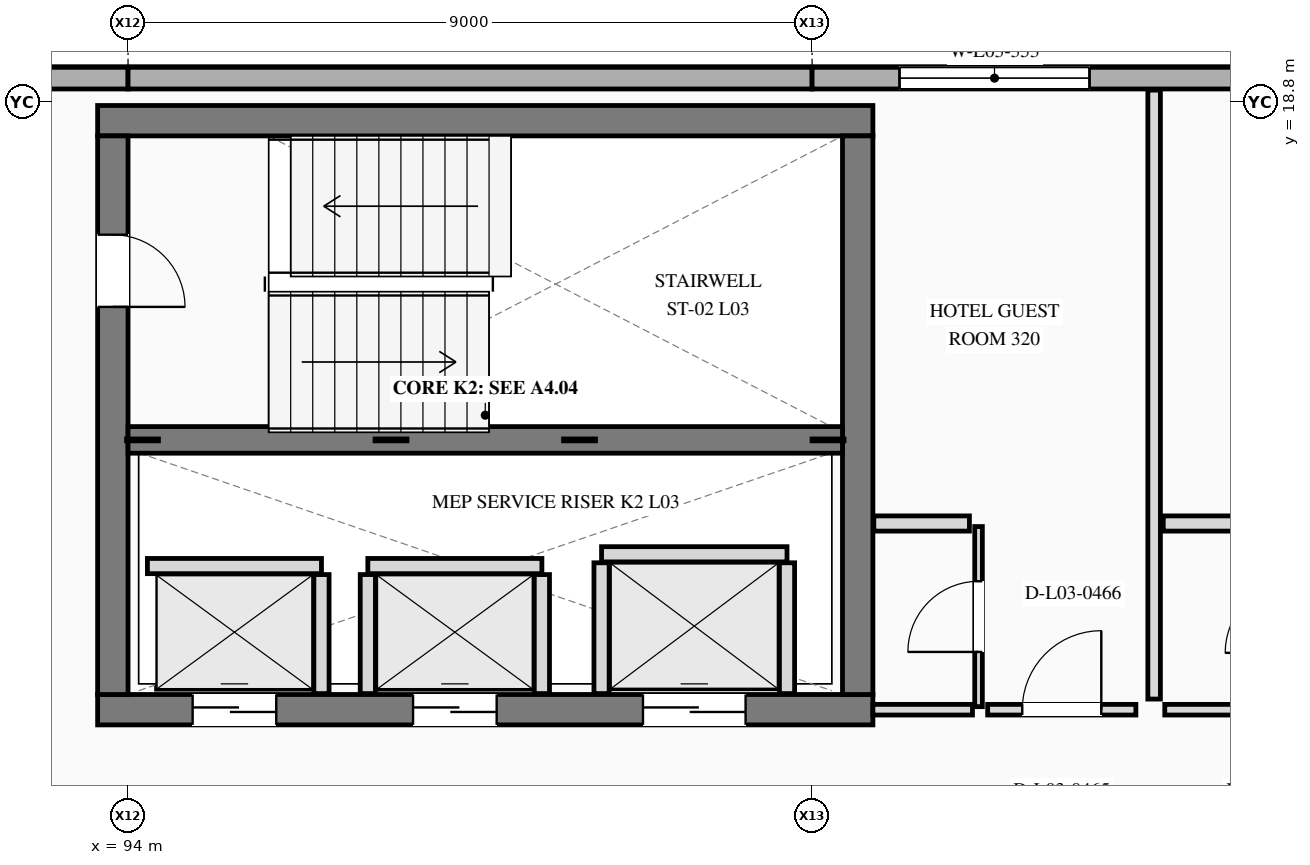
"""IFC4 building model, lengths in metres.
Left out: names, types, materials, properties, quantities, classifications, styles, units other than length and angle.
Written with IfcOpenShell. Run it as: python <this file> out.ifc"""

import sys

from ifc_helpers import new_model, si_unit, direction, frame, frame_2d, origin, place, context, subcontext, project, spatial, rectangle, extrude, element, fill, save


model = new_model("IFC4")
c1 = context("Model", 3, precision=1e-05, world=origin(), true_north=direction((0.0, 1.0)))
c2 = subcontext(c1, "Body", "Model", "MODEL_VIEW")
j1 = project(units=[si_unit("LENGTHUNIT", "METRE"), si_unit("PLANEANGLEUNIT", "RADIAN")], contexts=[c1])
p1 = place(None, origin())
s1 = spatial("IfcSite", under=j1, at=p1, CompositionType="ELEMENT")
p2 = place(p1, origin())
s2 = spatial("IfcBuilding", under=s1, at=p2, CompositionType="ELEMENT")
p3 = place(p2, frame((0.0, 0.0, 15.6)))
s3 = spatial("IfcBuildingStorey", under=s2, at=p3, CompositionType="ELEMENT", Elevation=15.6)
for number, where, z_axis, x_axis in (
    (1, (94.0, 19.11, 0.0), (0.0, 0.0, 1.0), (-1.0, 0.0, 0.0)),
    (2, (103.0, 19.11, 0.0), (0.0, 0.0, 1.0), (-1.0, 0.0, 0.0)),
):
    element("IfcWall", number, at=place(p3, frame(where, z_axis=z_axis, x_axis=x_axis)), inside=s3, PredefinedType="STANDARD", context=c2, shape_type="SweptSolid", body=[
        extrude(rectangle(XDim=9.0, YDim=0.285, at=frame_2d((4.5, 0.0))), origin(), (0.0, 0.0, 1.0), 3.9),
    ])
p4 = place(p3, frame((112.0, 19.11, 0.0), z_axis=(0.0, 0.0, 1.0), x_axis=(-1.0, 0.0, 0.0)))
e3 = element("IfcWall", 3, at=p4, inside=s3, PredefinedType="STANDARD", context=c2, shape_type="SweptSolid", body=[
    extrude(rectangle(XDim=9.0, YDim=0.285, at=frame_2d((4.5, 0.0))), origin(), (0.0, 0.0, 1.0), 3.9),
])
p5 = place(p4, frame((5.35, 0.0, 0.85)))
e4 = element("IfcOpeningElement", 4, at=p5, cuts=e3, PredefinedType="OPENING", context=c2, shape_type="SweptSolid", body=[
    extrude(rectangle(XDim=2.5, YDim=1.75, at=frame_2d((1.25, 0.875))), frame((0.0, 0.152, 0.0), z_axis=(0.0, -1.0, 0.0), x_axis=(1.0, 0.0, 0.0)), (0.0, 0.0, 1.0), 0.305),
])
p6 = place(p4, frame((1.55, 0.0, 0.85)))
e5 = element("IfcOpeningElement", 5, at=p6, cuts=e3, PredefinedType="OPENING", context=c2, shape_type="SweptSolid", body=[
    extrude(rectangle(XDim=1.7, YDim=1.6, at=frame_2d((0.85, 0.8))), frame((0.0, 0.152, 0.0), z_axis=(0.0, -1.0, 0.0), x_axis=(1.0, 0.0, 0.0)), (0.0, 0.0, 1.0), 0.305),
])
p7 = place(p3, frame((93.6, 10.8, 0.0), z_axis=(0.0, 0.0, 1.0), x_axis=(1.0, 0.0, 0.0)))
e6 = element("IfcWall", 6, at=p7, inside=s3, PredefinedType="SHEAR", context=c2, shape_type="SweptSolid", body=[
    extrude(rectangle(XDim=10.2, YDim=0.4, at=frame_2d((5.1, 0.0))), origin(), (0.0, 0.0, 1.0), 3.9),
])
p8 = place(p7, frame((1.25, 0.0, 0.0)))
e7 = element("IfcOpeningElement", 7, at=p8, cuts=e6, PredefinedType="OPENING", context=c2, shape_type="SweptSolid", body=[
    extrude(rectangle(XDim=1.1, YDim=2.2, at=frame_2d((0.55, 1.1))), frame((0.0, 0.21, 0.0), z_axis=(0.0, -1.0, 0.0), x_axis=(1.0, 0.0, 0.0)), (0.0, 0.0, 1.0), 0.42),
])
p9 = place(p7, frame((4.15, 0.0, 0.0)))
e8 = element("IfcOpeningElement", 8, at=p9, cuts=e6, PredefinedType="OPENING", context=c2, shape_type="SweptSolid", body=[
    extrude(rectangle(XDim=1.1, YDim=2.2, at=frame_2d((0.55, 1.1))), frame((0.0, 0.21, 0.0), z_axis=(0.0, -1.0, 0.0), x_axis=(1.0, 0.0, 0.0)), (0.0, 0.0, 1.0), 0.42),
])
p10 = place(p7, frame((7.175, 0.0, 0.0)))
e9 = element("IfcOpeningElement", 9, at=p10, cuts=e6, PredefinedType="OPENING", context=c2, shape_type="SweptSolid", body=[
    extrude(rectangle(XDim=1.35, YDim=2.3, at=frame_2d((0.675, 1.15))), frame((0.0, 0.21, 0.0), z_axis=(0.0, -1.0, 0.0), x_axis=(1.0, 0.0, 0.0)), (0.0, 0.0, 1.0), 0.42),
])
p11 = place(p3, frame((103.8, 18.55, 0.0), z_axis=(0.0, 0.0, 1.0), x_axis=(-1.0, 0.0, 0.0)))
e10 = element("IfcWall", 10, at=p11, inside=s3, PredefinedType="SHEAR", context=c2, shape_type="SweptSolid", body=[
    extrude(rectangle(XDim=10.2, YDim=0.4, at=frame_2d((5.1, 0.0))), origin(), (0.0, 0.0, 1.0), 3.9),
])
p12 = place(p3, frame((93.8, 18.35, 0.0), z_axis=(0.0, 0.0, 1.0), x_axis=(0.0, -1.0, 0.0)))
e11 = element("IfcWall", 11, at=p12, inside=s3, PredefinedType="SHEAR", context=c2, shape_type="SweptSolid", body=[
    extrude(rectangle(XDim=7.35, YDim=0.4, at=frame_2d((3.675, 0.0))), origin(), (0.0, 0.0, 1.0), 3.9),
])
p13 = place(p12, frame((1.3, 0.0, 0.0)))
e12 = element("IfcOpeningElement", 12, at=p13, cuts=e11, PredefinedType="OPENING", context=c2, shape_type="SweptSolid", body=[
    extrude(rectangle(XDim=0.95, YDim=2.2, at=frame_2d((0.475, 1.1))), frame((0.0, 0.21, 0.0), z_axis=(0.0, -1.0, 0.0), x_axis=(1.0, 0.0, 0.0)), (0.0, 0.0, 1.0), 0.42),
])
p14 = place(p3, frame((103.6, 11.0, 0.0), z_axis=(0.0, 0.0, 1.0), x_axis=(0.0, 1.0, 0.0)))
e13 = element("IfcWall", 13, at=p14, inside=s3, PredefinedType="SHEAR", context=c2, shape_type="SweptSolid", body=[
    extrude(rectangle(XDim=7.35, YDim=0.4, at=frame_2d((3.675, 0.0))), origin(), (0.0, 0.0, 1.0), 3.9),
])
p15 = place(p3, frame((94.0, 14.35, 0.0), z_axis=(0.0, 0.0, 1.0), x_axis=(1.0, 0.0, 0.0)))
e14 = element("IfcWall", 14, at=p15, inside=s3, PredefinedType="SHEAR", context=c2, shape_type="SweptSolid", body=[
    extrude(rectangle(XDim=9.4, YDim=0.35, at=frame_2d((4.7, 0.0))), origin(), (0.0, 0.0, 1.0), 3.9),
])
p16 = place(p3, frame((94.255, 12.69, 0.0), z_axis=(0.0, 0.0, 1.0), x_axis=(1.0, 0.0, 0.0)))
e15 = element("IfcWall", 15, at=p16, inside=s3, PredefinedType="PLUMBINGWALL", context=c2, shape_type="SweptSolid", body=[
    extrude(rectangle(XDim=2.29, YDim=0.2, at=frame_2d((1.145, 0.0))), origin(), (0.0, 0.0, 1.0), 3.6),
])
p17 = place(p3, frame((96.545, 11.012, 0.0), z_axis=(0.0, 0.0, 1.0), x_axis=(0.0, 1.0, 0.0)))
e16 = element("IfcWall", 16, at=p17, inside=s3, PredefinedType="PLUMBINGWALL", context=c2, shape_type="SweptSolid", body=[
    extrude(rectangle(XDim=1.566, YDim=0.2, at=frame_2d((0.783, 0.0))), origin(), (0.0, 0.0, 1.0), 3.6),
])
p18 = place(p3, frame((97.155, 12.69, 0.0), z_axis=(0.0, 0.0, 1.0), x_axis=(1.0, 0.0, 0.0)))
e17 = element("IfcWall", 17, at=p18, inside=s3, PredefinedType="PLUMBINGWALL", context=c2, shape_type="SweptSolid", body=[
    extrude(rectangle(XDim=2.29, YDim=0.2, at=frame_2d((1.145, 0.0))), origin(), (0.0, 0.0, 1.0), 3.6),
])
for number, where, z_axis, x_axis in (
    (18, (97.155, 11.012, 0.0), (0.0, 0.0, 1.0), (0.0, 1.0, 0.0)),
    (19, (99.445, 11.012, 0.0), (0.0, 0.0, 1.0), (0.0, 1.0, 0.0)),
):
    element("IfcWall", number, at=place(p3, frame(where, z_axis=z_axis, x_axis=x_axis)), inside=s3, PredefinedType="PLUMBINGWALL", context=c2, shape_type="SweptSolid", body=[
        extrude(rectangle(XDim=1.566, YDim=0.2, at=frame_2d((0.783, 0.0))), origin(), (0.0, 0.0, 1.0), 3.6),
    ])
p19 = place(p3, frame((100.23, 12.845, 0.0), z_axis=(0.0, 0.0, 1.0), x_axis=(1.0, 0.0, 0.0)))
e20 = element("IfcWall", 20, at=p19, inside=s3, PredefinedType="PLUMBINGWALL", context=c2, shape_type="SweptSolid", body=[
    extrude(rectangle(XDim=2.44, YDim=0.2, at=frame_2d((1.22, 0.0))), origin(), (0.0, 0.0, 1.0), 3.6),
])
for number, where, z_axis, x_axis in (
    (21, (100.23, 11.012, 0.0), (0.0, 0.0, 1.0), (0.0, 1.0, 0.0)),
    (22, (102.67, 11.012, 0.0), (0.0, 0.0, 1.0), (0.0, 1.0, 0.0)),
):
    element("IfcWall", number, at=place(p3, frame(where, z_axis=z_axis, x_axis=x_axis)), inside=s3, PredefinedType="PLUMBINGWALL", context=c2, shape_type="SweptSolid", body=[
        extrude(rectangle(XDim=1.721, YDim=0.2, at=frame_2d((0.86, 0.0))), origin(), (0.0, 0.0, 1.0), 3.6),
    ])
p20 = place(p3, frame((103.8, 10.8, 0.0), z_axis=(0.0, 0.0, 1.0), x_axis=(1.0, 0.0, 0.0)))
e23 = element("IfcWall", 23, at=p20, inside=s3, PredefinedType="PARTITIONING", context=c2, shape_type="SweptSolid", body=[
    extrude(rectangle(XDim=1.31, YDim=0.14, at=frame_2d((0.655, 0.0))), origin(), (0.0, 0.0, 1.0), 3.6),
])
p21 = place(p3, frame((105.31, 10.8, 0.0), z_axis=(0.0, 0.0, 1.0), x_axis=(1.0, 0.0, 0.0)))
e24 = element("IfcWall", 24, at=p21, inside=s3, PredefinedType="PARTITIONING", context=c2, shape_type="SweptSolid", body=[
    extrude(rectangle(XDim=1.95, YDim=0.14, at=frame_2d((0.975, 0.0))), origin(), (0.0, 0.0, 1.0), 3.6),
])
p22 = place(p21, frame((0.455, 0.0, 0.0)))
e25 = element("IfcOpeningElement", 25, at=p22, cuts=e24, PredefinedType="OPENING", context=c2, shape_type="SweptSolid", body=[
    extrude(rectangle(XDim=1.04, YDim=2.4, at=frame_2d((0.52, 1.2))), frame((0.0, 0.08, 0.0), z_axis=(0.0, -1.0, 0.0), x_axis=(1.0, 0.0, 0.0)), (0.0, 0.0, 1.0), 0.16),
])
p23 = place(p3, frame((107.5, 10.94, 0.0), z_axis=(0.0, 0.0, 1.0), x_axis=(0.0, 1.0, 0.0)))
e26 = element("IfcWall", 26, at=p23, inside=s3, PredefinedType="PARTITIONING", context=c2, shape_type="SweptSolid", body=[
    extrude(rectangle(XDim=8.012, YDim=0.165, at=frame_2d((4.006, 0.0))), origin(), (0.0, 0.0, 1.0), 3.6),
])
p24 = place(p3, frame((105.19, 10.84, 0.0), z_axis=(0.0, 0.0, 1.0), x_axis=(0.0, 1.0, 0.0)))
e27 = element("IfcWall", 27, at=p24, inside=s3, PredefinedType="PARTITIONING", context=c2, shape_type="SweptSolid", body=[
    extrude(rectangle(XDim=2.37, YDim=0.1, at=frame_2d((1.185, 0.0))), origin(), (0.0, 0.0, 1.0), 3.6),
])
p25 = place(p24, frame((0.72, 0.0, 0.0)))
e28 = element("IfcOpeningElement", 28, at=p25, cuts=e27, PredefinedType="OPENING", context=c2, shape_type="SweptSolid", body=[
    extrude(rectangle(XDim=0.93, YDim=2.22, at=frame_2d((0.465, 1.11))), frame((0.0, 0.06, 0.0), z_axis=(0.0, -1.0, 0.0), x_axis=(1.0, 0.0, 0.0)), (0.0, 0.0, 1.0), 0.12),
])
p26 = place(p3, frame((103.812, 13.25, 0.0), z_axis=(0.0, 0.0, 1.0), x_axis=(1.0, 0.0, 0.0)))
e29 = element("IfcWall", 29, at=p26, inside=s3, PredefinedType="PLUMBINGWALL", context=c2, shape_type="SweptSolid", body=[
    extrude(rectangle(XDim=1.258, YDim=0.2, at=frame_2d((0.629, 0.0))), origin(), (0.0, 0.0, 1.0), 3.6),
])
p27 = place(p3, frame((107.64, 10.8, 0.0), z_axis=(0.0, 0.0, 1.0), x_axis=(1.0, 0.0, 0.0)))
e30 = element("IfcWall", 30, at=p27, inside=s3, PredefinedType="PARTITIONING", context=c2, shape_type="SweptSolid", body=[
    extrude(rectangle(XDim=1.67, YDim=0.14, at=frame_2d((0.835, 0.0))), origin(), (0.0, 0.0, 1.0), 3.6),
])
p28 = place(p3, frame((107.62, 13.25, 0.0), z_axis=(0.0, 0.0, 1.0), x_axis=(1.0, 0.0, 0.0)))
e31 = element("IfcWall", 31, at=p28, inside=s3, PredefinedType="PLUMBINGWALL", context=c2, shape_type="SweptSolid", body=[
    extrude(rectangle(XDim=1.65, YDim=0.2, at=frame_2d((0.825, 0.0))), origin(), (0.0, 0.0, 1.0), 3.6),
])
p29 = place(p5, origin())
e32 = element("IfcWindow", 32, at=p29, inside=s3, PartitioningType="SINGLE_PANEL", PredefinedType="WINDOW", context=c2, shape_type="SweptSolid", body=[
    extrude(rectangle(XDim=2.5, YDim=1.75, at=frame_2d((1.25, 0.875))), frame((0.0, 0.03, 0.0), z_axis=(0.0, -1.0, 0.0), x_axis=(1.0, 0.0, 0.0)), (0.0, 0.0, 1.0), 0.06),
])
fill(e4, e32)
p30 = place(p13, origin())
e33 = element("IfcDoor", 33, at=p30, inside=s3, OperationType="SINGLE_SWING_RIGHT", PredefinedType="DOOR", context=c2, shape_type="SweptSolid", body=[
    extrude(rectangle(XDim=0.95, YDim=2.2, at=frame_2d((0.475, 1.1))), frame((0.0, 0.025, 0.0), z_axis=(0.0, -1.0, 0.0), x_axis=(1.0, 0.0, 0.0)), (0.0, 0.0, 1.0), 0.05),
])
fill(e12, e33)
p31 = place(p8, origin())
e34 = element("IfcDoor", 34, at=p31, inside=s3, OperationType="SLIDING_TO_LEFT", PredefinedType="DOOR", context=c2, shape_type="SweptSolid", body=[
    extrude(rectangle(XDim=1.1, YDim=2.2, at=frame_2d((0.55, 1.1))), frame((0.0, 0.025, 0.0), z_axis=(0.0, -1.0, 0.0), x_axis=(1.0, 0.0, 0.0)), (0.0, 0.0, 1.0), 0.05),
])
fill(e7, e34)
p32 = place(p9, origin())
e35 = element("IfcDoor", 35, at=p32, inside=s3, OperationType="SLIDING_TO_RIGHT", PredefinedType="DOOR", context=c2, shape_type="SweptSolid", body=[
    extrude(rectangle(XDim=1.1, YDim=2.2, at=frame_2d((0.55, 1.1))), frame((0.0, 0.025, 0.0), z_axis=(0.0, -1.0, 0.0), x_axis=(1.0, 0.0, 0.0)), (0.0, 0.0, 1.0), 0.05),
])
fill(e8, e35)
p33 = place(p10, origin())
e36 = element("IfcDoor", 36, at=p33, inside=s3, OperationType="SLIDING_TO_LEFT", PredefinedType="DOOR", context=c2, shape_type="SweptSolid", body=[
    extrude(rectangle(XDim=1.35, YDim=2.3, at=frame_2d((0.675, 1.15))), frame((0.0, 0.025, 0.0), z_axis=(0.0, -1.0, 0.0), x_axis=(1.0, 0.0, 0.0)), (0.0, 0.0, 1.0), 0.05),
])
fill(e9, e36)
p34 = place(p22, origin())
e37 = element("IfcDoor", 37, at=p34, inside=s3, OperationType="SINGLE_SWING_RIGHT", PredefinedType="DOOR", context=c2, shape_type="SweptSolid", body=[
    extrude(rectangle(XDim=1.04, YDim=2.4, at=frame_2d((0.52, 1.2))), frame((0.0, 0.025, 0.0), z_axis=(0.0, -1.0, 0.0), x_axis=(1.0, 0.0, 0.0)), (0.0, 0.0, 1.0), 0.05),
])
fill(e25, e37)
p35 = place(p25, origin())
e38 = element("IfcDoor", 38, at=p35, inside=s3, OperationType="SINGLE_SWING_LEFT", PredefinedType="DOOR", context=c2, shape_type="SweptSolid", body=[
    extrude(rectangle(XDim=0.93, YDim=2.22, at=frame_2d((0.465, 1.11))), frame((0.0, 0.025, 0.0), z_axis=(0.0, -1.0, 0.0), x_axis=(1.0, 0.0, 0.0)), (0.0, 0.0, 1.0), 0.05),
])
fill(e28, e38)
save(model, sys.argv[1])
